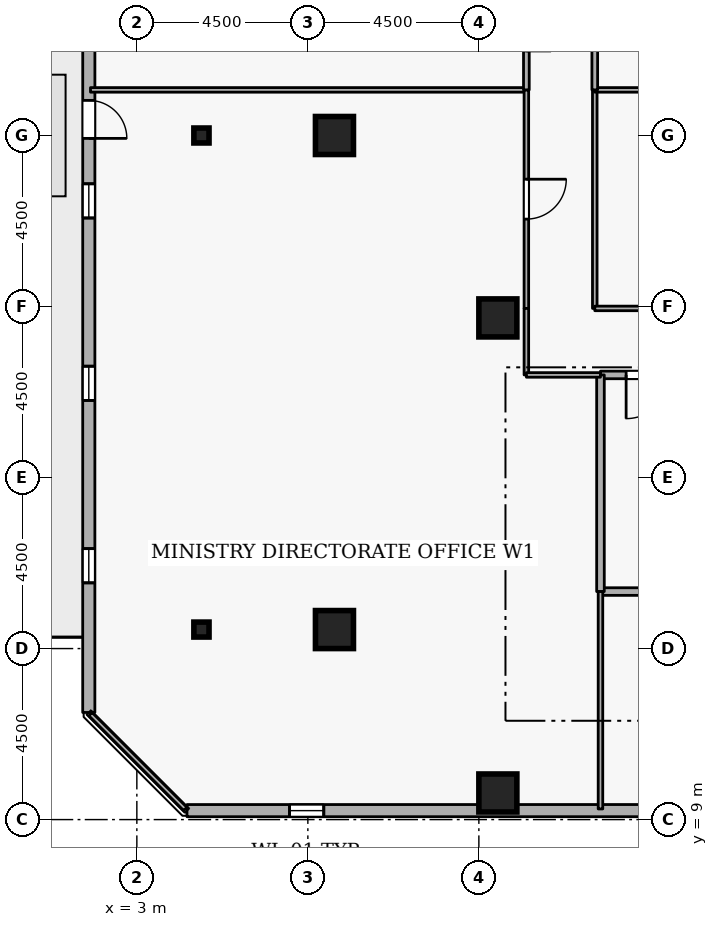
"""IFC4 building model, lengths in metres.
Left out: names, types, materials, properties, quantities, classifications, styles, units other than length and angle.
Written with IfcOpenShell. Run it as: python <this file> out.ifc"""

import sys

from ifc_helpers import new_model, si_unit, direction, frame, frame_2d, origin, origin_2d, place, context, subcontext, project, spatial, rectangle, i_section, extrude, element, fill, save


model = new_model("IFC4")
c1 = context("Model", 3, precision=1e-05, world=origin(), true_north=direction((0.0, 1.0)))
c2 = subcontext(c1, "Body", "Model", "MODEL_VIEW")
j1 = project(units=[si_unit("LENGTHUNIT", "METRE"), si_unit("PLANEANGLEUNIT", "RADIAN")], contexts=[c1])
p1 = place(None, origin())
s1 = spatial("IfcSite", under=j1, at=p1, CompositionType="ELEMENT")
p2 = place(p1, origin())
s2 = spatial("IfcBuilding", under=s1, at=p2, CompositionType="ELEMENT")
p3 = place(p2, frame((0.0, 0.0, 214.5)))
s3 = spatial("IfcBuildingStorey", under=s2, at=p3, CompositionType="ELEMENT", Elevation=214.5)
for number, where, z_axis, x_axis in (
    (1, (12.5, 9.7, 0.0), (0.0, 0.0, 1.0), (1.0, 0.0, 0.0)),
    (2, (8.2, 14.0, 0.0), (0.0, 0.0, 1.0), (1.0, 0.0, 0.0)),
    (3, (8.2, 27.0, 0.0), (0.0, 0.0, 1.0), (1.0, 0.0, 0.0)),
    (4, (12.5, 22.2, 0.0), (0.0, 0.0, 1.0), (1.0, 0.0, 0.0)),
):
    element("IfcColumn", number, at=place(p3, frame(where, z_axis=z_axis, x_axis=x_axis)), inside=s3, PredefinedType="COLUMN", context=c2, shape_type="SweptSolid", body=[
        extrude(rectangle(XDim=1.0, YDim=1.0, at=origin_2d()), origin(), (0.0, 0.0, 1.0), 3.6),
    ])
for number, where, z_axis, x_axis in (
    (5, (4.7, 14.0, 0.0), (0.0, 0.0, 1.0), (1.0, 0.0, 0.0)),
    (6, (4.7, 27.0, 0.0), (0.0, 0.0, 1.0), (1.0, 0.0, 0.0)),
):
    element("IfcColumn", number, at=place(p3, frame(where, z_axis=z_axis, x_axis=x_axis)), inside=s3, PredefinedType="COLUMN", context=c2, shape_type="SweptSolid", body=[
        extrude(i_section(OverallWidth=0.399, OverallDepth=0.394, WebThickness=0.023, FlangeThickness=0.037, FilletRadius=0.015, at=origin_2d()), origin(), (0.0, 0.0, 1.0), 3.6),
    ])
p4 = place(p3, frame((4.319, 9.235, 0.0), z_axis=(0.0, 0.0, 1.0), x_axis=(0.999999998513, 5.4540124e-05, 0.0)))
e7 = element("IfcWall", 7, at=p4, inside=s3, PredefinedType="STANDARD", context=c2, shape_type="SweptSolid", body=[
    extrude(rectangle(XDim=35.811, YDim=0.32, at=frame_2d((17.905, 0.0))), origin(), (0.0, 0.0, 1.0), 2.7),
])
p5 = place(p4, frame((2.7, 0.0, 0.72)))
e8 = element("IfcOpeningElement", 8, at=p5, cuts=e7, PredefinedType="OPENING", context=c2, shape_type="SweptSolid", body=[
    extrude(rectangle(XDim=0.9, YDim=1.75, at=frame_2d((0.45, 0.875))), frame((0.0, 0.17, 0.0), z_axis=(0.0, -1.0, 0.0), x_axis=(1.0, 0.0, 0.0)), (0.0, 0.0, 1.0), 0.34),
])
p6 = place(p4, frame((12.3, 0.0, 0.72)))
e9 = element("IfcOpeningElement", 9, at=p6, cuts=e7, PredefinedType="OPENING", context=c2, shape_type="SweptSolid", body=[
    extrude(rectangle(XDim=0.9, YDim=1.75, at=frame_2d((0.45, 0.875))), frame((0.0, 0.17, 0.0), z_axis=(0.0, -1.0, 0.0), x_axis=(1.0, 0.0, 0.0)), (0.0, 0.0, 1.0), 0.34),
])
p7 = place(p4, frame((17.1, 0.0, 0.72)))
e10 = element("IfcOpeningElement", 10, at=p7, cuts=e7, PredefinedType="OPENING", context=c2, shape_type="SweptSolid", body=[
    extrude(rectangle(XDim=0.9, YDim=1.75, at=frame_2d((0.45, 0.875))), frame((0.0, 0.17, 0.0), z_axis=(0.0, -1.0, 0.0), x_axis=(1.0, 0.0, 0.0)), (0.0, 0.0, 1.0), 0.34),
])
p8 = place(p4, frame((26.7, 0.0, 0.72)))
e11 = element("IfcOpeningElement", 11, at=p8, cuts=e7, PredefinedType="OPENING", context=c2, shape_type="SweptSolid", body=[
    extrude(rectangle(XDim=0.9, YDim=1.75, at=frame_2d((0.45, 0.875))), frame((0.0, 0.17, 0.0), z_axis=(0.0, -1.0, 0.0), x_axis=(1.0, 0.0, 0.0)), (0.0, 0.0, 1.0), 0.34),
])
p9 = place(p4, frame((31.5, 0.0, 0.72)))
e12 = element("IfcOpeningElement", 12, at=p9, cuts=e7, PredefinedType="OPENING", context=c2, shape_type="SweptSolid", body=[
    extrude(rectangle(XDim=0.9, YDim=1.75, at=frame_2d((0.45, 0.875))), frame((0.0, 0.17, 0.0), z_axis=(0.0, -1.0, 0.0), x_axis=(1.0, 0.0, 0.0)), (0.0, 0.0, 1.0), 0.34),
])
p10 = place(p3, frame((1.737, 47.629, 0.0), z_axis=(0.0, 0.0, 1.0), x_axis=(-5.4540124e-05, -0.999999998513, 0.0)))
e13 = element("IfcWall", 13, at=p10, inside=s3, PredefinedType="STANDARD", context=c2, shape_type="SweptSolid", body=[
    extrude(rectangle(XDim=35.811, YDim=0.32, at=frame_2d((17.905, 0.0))), origin(), (0.0, 0.0, 1.0), 2.7),
])
p11 = place(p10, frame((19.706, 0.0, 0.0)))
e14 = element("IfcOpeningElement", 14, at=p11, cuts=e13, PredefinedType="OPENING", context=c2, shape_type="SweptSolid", body=[
    extrude(rectangle(XDim=1.0, YDim=2.08, at=frame_2d((0.5, 1.04))), frame((0.0, 0.17, 0.0), z_axis=(0.0, -1.0, 0.0), x_axis=(1.0, 0.0, 0.0)), (0.0, 0.0, 1.0), 0.34),
])
p12 = place(p10, frame((2.7, 0.0, 0.72)))
e15 = element("IfcOpeningElement", 15, at=p12, cuts=e13, PredefinedType="OPENING", context=c2, shape_type="SweptSolid", body=[
    extrude(rectangle(XDim=0.9, YDim=1.75, at=frame_2d((0.45, 0.875))), frame((0.0, 0.17, 0.0), z_axis=(0.0, -1.0, 0.0), x_axis=(1.0, 0.0, 0.0)), (0.0, 0.0, 1.0), 0.34),
])
p13 = place(p10, frame((7.5, 0.0, 0.72)))
e16 = element("IfcOpeningElement", 16, at=p13, cuts=e13, PredefinedType="OPENING", context=c2, shape_type="SweptSolid", body=[
    extrude(rectangle(XDim=0.9, YDim=1.75, at=frame_2d((0.45, 0.875))), frame((0.0, 0.17, 0.0), z_axis=(0.0, -1.0, 0.0), x_axis=(1.0, 0.0, 0.0)), (0.0, 0.0, 1.0), 0.34),
])
p14 = place(p10, frame((12.3, 0.0, 0.72)))
e17 = element("IfcOpeningElement", 17, at=p14, cuts=e13, PredefinedType="OPENING", context=c2, shape_type="SweptSolid", body=[
    extrude(rectangle(XDim=0.9, YDim=1.75, at=frame_2d((0.45, 0.875))), frame((0.0, 0.17, 0.0), z_axis=(0.0, -1.0, 0.0), x_axis=(1.0, 0.0, 0.0)), (0.0, 0.0, 1.0), 0.34),
])
p15 = place(p10, frame((17.1, 0.0, 0.72)))
e18 = element("IfcOpeningElement", 18, at=p15, cuts=e13, PredefinedType="OPENING", context=c2, shape_type="SweptSolid", body=[
    extrude(rectangle(XDim=0.9, YDim=1.75, at=frame_2d((0.45, 0.875))), frame((0.0, 0.17, 0.0), z_axis=(0.0, -1.0, 0.0), x_axis=(1.0, 0.0, 0.0)), (0.0, 0.0, 1.0), 0.34),
])
p16 = place(p10, frame((21.9, 0.0, 0.72)))
e19 = element("IfcOpeningElement", 19, at=p16, cuts=e13, PredefinedType="OPENING", context=c2, shape_type="SweptSolid", body=[
    extrude(rectangle(XDim=0.9, YDim=1.75, at=frame_2d((0.45, 0.875))), frame((0.0, 0.17, 0.0), z_axis=(0.0, -1.0, 0.0), x_axis=(1.0, 0.0, 0.0)), (0.0, 0.0, 1.0), 0.34),
])
p17 = place(p10, frame((26.7, 0.0, 0.72)))
e20 = element("IfcOpeningElement", 20, at=p17, cuts=e13, PredefinedType="OPENING", context=c2, shape_type="SweptSolid", body=[
    extrude(rectangle(XDim=0.9, YDim=1.75, at=frame_2d((0.45, 0.875))), frame((0.0, 0.17, 0.0), z_axis=(0.0, -1.0, 0.0), x_axis=(1.0, 0.0, 0.0)), (0.0, 0.0, 1.0), 0.34),
])
p18 = place(p10, frame((31.5, 0.0, 0.72)))
e21 = element("IfcOpeningElement", 21, at=p18, cuts=e13, PredefinedType="OPENING", context=c2, shape_type="SweptSolid", body=[
    extrude(rectangle(XDim=0.9, YDim=1.75, at=frame_2d((0.45, 0.875))), frame((0.0, 0.17, 0.0), z_axis=(0.0, -1.0, 0.0), x_axis=(1.0, 0.0, 0.0)), (0.0, 0.0, 1.0), 0.34),
])
p19 = place(p3, frame((15.2, 15.0, 0.0), z_axis=(0.0, 0.0, 1.0), x_axis=(1.0, 0.0, 0.0)))
e22 = element("IfcWall", 22, at=p19, inside=s3, PredefinedType="STANDARD", context=c2, shape_type="SweptSolid", body=[
    extrude(rectangle(XDim=2.5, YDim=0.2, at=frame_2d((1.25, 0.0))), origin(), (0.0, 0.0, 1.0), 3.34),
])
p20 = place(p3, frame((17.7, 20.7, 0.0), z_axis=(0.0, 0.0, 1.0), x_axis=(-1.0, 0.0, 0.0)))
e23 = element("IfcWall", 23, at=p20, inside=s3, PredefinedType="STANDARD", context=c2, shape_type="SweptSolid", body=[
    extrude(rectangle(XDim=2.5, YDim=0.2, at=frame_2d((1.25, 0.0))), origin(), (0.0, 0.0, 1.0), 3.34),
])
p21 = place(p20, frame((0.675, 0.0, 0.0)))
e24 = element("IfcOpeningElement", 24, at=p21, cuts=e23, PredefinedType="OPENING", context=c2, shape_type="SweptSolid", body=[
    extrude(rectangle(XDim=1.15, YDim=2.1, at=frame_2d((0.575, 1.05))), frame((0.0, 0.11, 0.0), z_axis=(0.0, -1.0, 0.0), x_axis=(1.0, 0.0, 0.0)), (0.0, 0.0, 1.0), 0.22),
])
p22 = place(p3, frame((15.2, 20.7, 0.0), z_axis=(0.0, 0.0, 1.0), x_axis=(0.0, -1.0, 0.0)))
e25 = element("IfcWall", 25, at=p22, inside=s3, PredefinedType="STANDARD", context=c2, shape_type="SweptSolid", body=[
    extrude(rectangle(XDim=5.7, YDim=0.2, at=frame_2d((2.85, 0.0))), origin(), (0.0, 0.0, 1.0), 3.34),
])
p23 = place(p3, frame((1.78, 28.2, 0.0), z_axis=(0.0, 0.0, 1.0), x_axis=(1.0, 0.0, 0.0)))
e26 = element("IfcWall", 26, at=p23, inside=s3, PredefinedType="PARTITIONING", context=c2, shape_type="SweptSolid", body=[
    extrude(rectangle(XDim=11.47, YDim=0.12, at=frame_2d((5.735, 0.0))), origin(), (0.0, 0.0, 1.0), 3.34),
])
p24 = place(p3, frame((13.25, 28.2, 0.0), z_axis=(0.0, 0.0, 1.0), x_axis=(0.0, -1.0, 0.0)))
e27 = element("IfcWall", 27, at=p24, inside=s3, PredefinedType="PARTITIONING", context=c2, shape_type="SweptSolid", body=[
    extrude(rectangle(XDim=5.75, YDim=0.12, at=frame_2d((2.875, 0.0))), origin(), (0.0, 0.0, 1.0), 3.34),
])
p25 = place(p24, frame((2.35, 0.0, 0.0)))
e28 = element("IfcOpeningElement", 28, at=p25, cuts=e27, PredefinedType="OPENING", context=c2, shape_type="SweptSolid", body=[
    extrude(rectangle(XDim=1.05, YDim=2.1, at=frame_2d((0.525, 1.05))), frame((0.0, 0.07, 0.0), z_axis=(0.0, -1.0, 0.0), x_axis=(1.0, 0.0, 0.0)), (0.0, 0.0, 1.0), 0.14),
])
p26 = place(p3, frame((13.25, 22.45, 0.0), z_axis=(0.0, 0.0, 1.0), x_axis=(0.0, -1.0, 0.0)))
e29 = element("IfcWall", 29, at=p26, inside=s3, PredefinedType="PARTITIONING", context=c2, shape_type="SweptSolid", body=[
    extrude(rectangle(XDim=1.75, YDim=0.12, at=frame_2d((0.875, 0.0))), origin(), (0.0, 0.0, 1.0), 3.34),
])
p27 = place(p3, frame((13.25, 20.7, 0.0), z_axis=(0.0, 0.0, 1.0), x_axis=(1.0, 0.0, 0.0)))
e30 = element("IfcWall", 30, at=p27, inside=s3, PredefinedType="PARTITIONING", context=c2, shape_type="SweptSolid", body=[
    extrude(rectangle(XDim=1.95, YDim=0.12, at=frame_2d((0.975, 0.0))), origin(), (0.0, 0.0, 1.0), 3.34),
])
p28 = place(p3, frame((15.2, 15.0, 0.0), z_axis=(0.0, 0.0, 1.0), x_axis=(0.0, -1.0, 0.0)))
e31 = element("IfcWall", 31, at=p28, inside=s3, PredefinedType="PARTITIONING", context=c2, shape_type="SweptSolid", body=[
    extrude(rectangle(XDim=5.72, YDim=0.12, at=frame_2d((2.86, 0.0))), origin(), (0.0, 0.0, 1.0), 3.34),
])
p29 = place(p3, frame((4.275, 9.28, 0.0), z_axis=(0.0, 0.0, 1.0), x_axis=(-0.707106781187, 0.707106781187, 0.0)))
e32 = element("IfcWall", 32, at=p29, inside=s3, PredefinedType="PARTITIONING", context=c2, shape_type="SweptSolid", body=[
    extrude(rectangle(XDim=3.528, YDim=0.12, at=frame_2d((1.764, 0.0))), origin(), (0.0, 0.0, 1.0), 3.34),
])
p30 = place(p3, frame((13.25, 31.55, 0.0), z_axis=(0.0, 0.0, 1.0), x_axis=(0.0, -1.0, 0.0)))
e33 = element("IfcWall", 33, at=p30, inside=s3, PredefinedType="PARTITIONING", context=c2, shape_type="SweptSolid", body=[
    extrude(rectangle(XDim=3.35, YDim=0.15, at=frame_2d((1.675, 0.0))), origin(), (0.0, 0.0, 1.0), 3.34),
])
p31 = place(p30, frame((1.025, 0.0, 0.0)))
e34 = element("IfcOpeningElement", 34, at=p31, cuts=e33, PredefinedType="OPENING", context=c2, shape_type="SweptSolid", body=[
    extrude(rectangle(XDim=1.3, YDim=2.12, at=frame_2d((0.65, 1.06))), frame((0.0, 0.085, 0.0), z_axis=(0.0, -1.0, 0.0), x_axis=(1.0, 0.0, 0.0)), (0.0, 0.0, 1.0), 0.17),
])
p32 = place(p3, frame((15.05, 22.45, 0.0), z_axis=(0.0, 0.0, 1.0), x_axis=(0.0, 1.0, 0.0)))
e35 = element("IfcWall", 35, at=p32, inside=s3, PredefinedType="PARTITIONING", context=c2, shape_type="SweptSolid", body=[
    extrude(rectangle(XDim=5.75, YDim=0.12, at=frame_2d((2.875, 0.0))), origin(), (0.0, 0.0, 1.0), 3.34),
])
p33 = place(p3, frame((15.05, 28.2, 0.0), z_axis=(0.0, 0.0, 1.0), x_axis=(1.0, 0.0, 0.0)))
e36 = element("IfcWall", 36, at=p33, inside=s3, PredefinedType="PARTITIONING", context=c2, shape_type="SweptSolid", body=[
    extrude(rectangle(XDim=5.85, YDim=0.12, at=frame_2d((2.925, 0.0))), origin(), (0.0, 0.0, 1.0), 3.34),
])
p34 = place(p3, frame((20.9, 22.45, 0.0), z_axis=(0.0, 0.0, 1.0), x_axis=(-1.0, 0.0, 0.0)))
e37 = element("IfcWall", 37, at=p34, inside=s3, PredefinedType="PARTITIONING", context=c2, shape_type="SweptSolid", body=[
    extrude(rectangle(XDim=5.85, YDim=0.12, at=frame_2d((2.925, 0.0))), origin(), (0.0, 0.0, 1.0), 3.34),
])
p35 = place(p34, frame((2.45, 0.0, 0.0)))
e38 = element("IfcOpeningElement", 38, at=p35, cuts=e37, PredefinedType="OPENING", context=c2, shape_type="SweptSolid", body=[
    extrude(rectangle(XDim=0.95, YDim=2.1, at=frame_2d((0.475, 1.05))), frame((0.0, 0.07, 0.0), z_axis=(0.0, -1.0, 0.0), x_axis=(1.0, 0.0, 0.0)), (0.0, 0.0, 1.0), 0.14),
])
p36 = place(p3, frame((15.05, 28.2, 0.0), z_axis=(0.0, 0.0, 1.0), x_axis=(0.0, 1.0, 0.0)))
e39 = element("IfcWall", 39, at=p36, inside=s3, PredefinedType="PARTITIONING", context=c2, shape_type="SweptSolid", body=[
    extrude(rectangle(XDim=3.35, YDim=0.15, at=frame_2d((1.675, 0.0))), origin(), (0.0, 0.0, 1.0), 3.34),
])
p37 = place(p5, origin())
e40 = element("IfcWindow", 40, at=p37, inside=s3, PartitioningType="SINGLE_PANEL", PredefinedType="WINDOW", context=c2, shape_type="SweptSolid", body=[
    extrude(rectangle(XDim=0.9, YDim=1.75, at=frame_2d((0.45, 0.875))), frame((0.0, 0.03, 0.0), z_axis=(0.0, -1.0, 0.0), x_axis=(1.0, 0.0, 0.0)), (0.0, 0.0, 1.0), 0.06),
])
fill(e8, e40)
p38 = place(p11, origin())
e41 = element("IfcDoor", 41, at=p38, inside=s3, OperationType="SINGLE_SWING_RIGHT", PredefinedType="DOOR", context=c2, shape_type="SweptSolid", body=[
    extrude(rectangle(XDim=1.0, YDim=2.08, at=frame_2d((0.5, 1.04))), frame((0.0, 0.025, 0.0), z_axis=(0.0, -1.0, 0.0), x_axis=(1.0, 0.0, 0.0)), (0.0, 0.0, 1.0), 0.05),
])
fill(e14, e41)
p39 = place(p16, origin())
e42 = element("IfcWindow", 42, at=p39, inside=s3, PartitioningType="SINGLE_PANEL", PredefinedType="WINDOW", context=c2, shape_type="SweptSolid", body=[
    extrude(rectangle(XDim=0.9, YDim=1.75, at=frame_2d((0.45, 0.875))), frame((0.0, 0.03, 0.0), z_axis=(0.0, -1.0, 0.0), x_axis=(1.0, 0.0, 0.0)), (0.0, 0.0, 1.0), 0.06),
])
fill(e19, e42)
p40 = place(p17, origin())
e43 = element("IfcWindow", 43, at=p40, inside=s3, PartitioningType="SINGLE_PANEL", PredefinedType="WINDOW", context=c2, shape_type="SweptSolid", body=[
    extrude(rectangle(XDim=0.9, YDim=1.75, at=frame_2d((0.45, 0.875))), frame((0.0, 0.03, 0.0), z_axis=(0.0, -1.0, 0.0), x_axis=(1.0, 0.0, 0.0)), (0.0, 0.0, 1.0), 0.06),
])
fill(e20, e43)
p41 = place(p18, origin())
e44 = element("IfcWindow", 44, at=p41, inside=s3, PartitioningType="SINGLE_PANEL", PredefinedType="WINDOW", context=c2, shape_type="SweptSolid", body=[
    extrude(rectangle(XDim=0.9, YDim=1.75, at=frame_2d((0.45, 0.875))), frame((0.0, 0.03, 0.0), z_axis=(0.0, -1.0, 0.0), x_axis=(1.0, 0.0, 0.0)), (0.0, 0.0, 1.0), 0.06),
])
fill(e21, e44)
p42 = place(p21, origin())
e45 = element("IfcDoor", 45, at=p42, inside=s3, OperationType="SINGLE_SWING_RIGHT", PredefinedType="DOOR", context=c2, shape_type="SweptSolid", body=[
    extrude(rectangle(XDim=1.15, YDim=2.1, at=frame_2d((0.575, 1.05))), frame((0.0, 0.025, 0.0), z_axis=(0.0, -1.0, 0.0), x_axis=(1.0, 0.0, 0.0)), (0.0, 0.0, 1.0), 0.05),
])
fill(e24, e45)
p43 = place(p25, origin())
e46 = element("IfcDoor", 46, at=p43, inside=s3, OperationType="SINGLE_SWING_LEFT", PredefinedType="DOOR", context=c2, shape_type="SweptSolid", body=[
    extrude(rectangle(XDim=1.05, YDim=2.1, at=frame_2d((0.525, 1.05))), frame((0.0, 0.025, 0.0), z_axis=(0.0, -1.0, 0.0), x_axis=(1.0, 0.0, 0.0)), (0.0, 0.0, 1.0), 0.05),
])
fill(e28, e46)
save(model, sys.argv[1])
